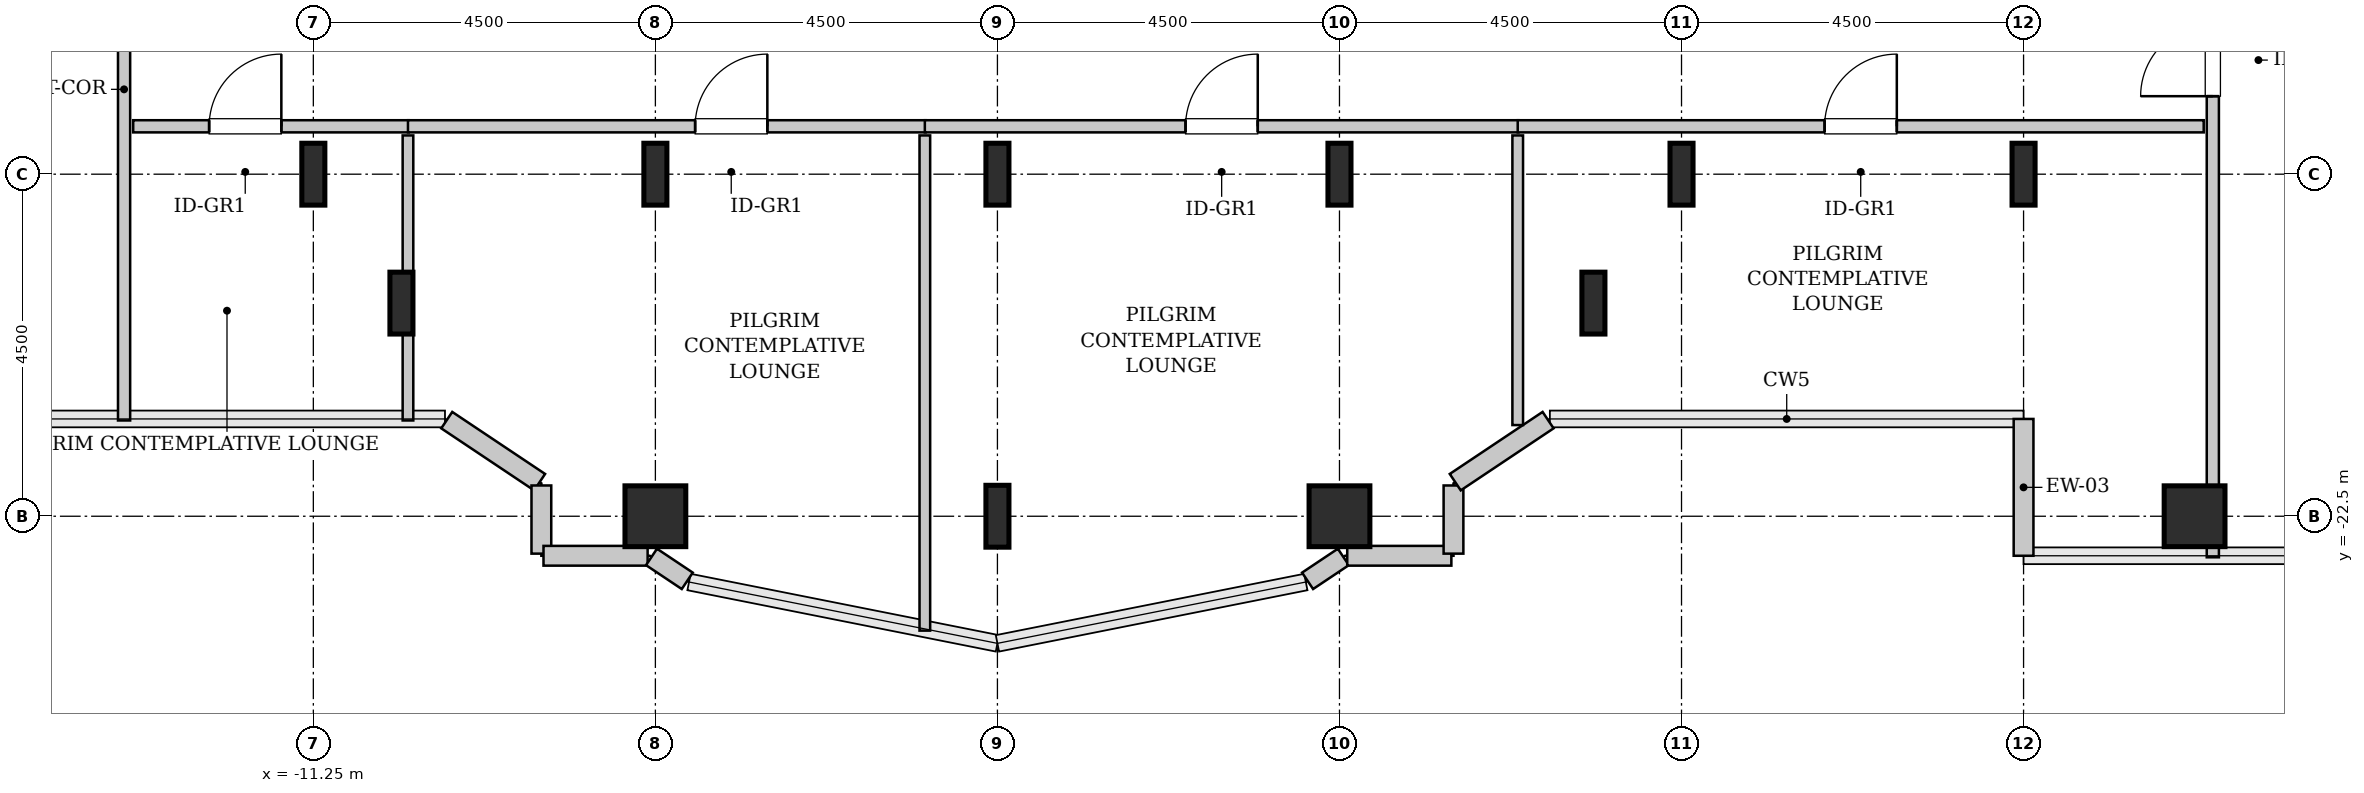
"""IFC4 building model, lengths in metres.
Left out: names, types, materials, properties, quantities, classifications, styles, units other than length and angle.
Written with IfcOpenShell. Run it as: python <this file> out.ifc"""

import sys

from ifc_helpers import new_model, si_unit, direction, frame, frame_2d, origin, origin_2d, place, context, subcontext, project, spatial, rectangle, hollow_rectangle, i_section, extrude, source, transform, mapped, element, fill, save


model = new_model("IFC4")
c1 = context("Model", 3, precision=1e-05, world=origin(), true_north=direction((0.0, 1.0)))
c2 = subcontext(c1, "Body", "Model", "MODEL_VIEW")
j1 = project(units=[si_unit("LENGTHUNIT", "METRE"), si_unit("PLANEANGLEUNIT", "RADIAN")], contexts=[c1])
p1 = place(None, origin())
s1 = spatial("IfcSite", under=j1, at=p1, CompositionType="ELEMENT")
p2 = place(p1, origin())
s2 = spatial("IfcBuilding", under=s1, at=p2, CompositionType="ELEMENT")
p3 = place(p2, frame((0.0, 0.0, 198.2)))
s3 = spatial("IfcBuildingStorey", under=s2, at=p3, CompositionType="ELEMENT", Elevation=198.2)
m1 = source(origin(), c2, "Body", "SweptSolid", [
    extrude(i_section(OverallWidth=0.303, OverallDepth=0.814, WebThickness=0.021, FlangeThickness=0.04, FilletRadius=0.03, at=origin_2d()), origin(), (0.0, 0.0, 1.0), 3.8),
])
for number, where, z_axis, x_axis in (
    (1, (-11.25, -18.0, 0.0), (0.0, 0.0, 1.0), (1.0, 0.0, 0.0)),
    (2, (-10.091, -19.696, 0.0), (0.0, 0.0, 1.0), (1.0, 0.0, 0.0)),
):
    element("IfcColumn", number, at=place(p3, frame(where, z_axis=z_axis, x_axis=x_axis)), inside=s3, PredefinedType="COLUMN", context=c2, shape_type="MappedRepresentation", body=[
        mapped(m1, transform((0.0, 0.0, 0.0), x_axis=(1.0, 0.0, 0.0), y_axis=(0.0, 1.0, 0.0), z_axis=(0.0, 0.0, 1.0), scale=1.0)),
    ])
m2 = source(origin(), c2, "Body", "SweptSolid", [
    extrude(hollow_rectangle(XDim=0.8, YDim=0.8, WallThickness=0.04, InnerFilletRadius=0.04, OuterFilletRadius=0.08, at=origin_2d()), origin(), (0.0, 0.0, 1.0), 3.8),
])
p4 = place(p3, frame((-6.75, -22.5, 0.0), z_axis=(0.0, 0.0, 1.0), x_axis=(1.0, 0.0, 0.0)))
e3 = element("IfcColumn", 3, at=p4, inside=s3, PredefinedType="COLUMN", context=c2, shape_type="MappedRepresentation", body=[
    mapped(m2, transform((0.0, 0.0, 0.0), x_axis=(1.0, 0.0, 0.0), y_axis=(0.0, 1.0, 0.0), z_axis=(0.0, 0.0, 1.0), scale=1.0)),
])
for number, where, z_axis, x_axis in (
    (4, (-6.75, -18.0, 0.0), (0.0, 0.0, 1.0), (1.0, 0.0, 0.0)),
    (5, (-2.25, -22.5, 0.0), (0.0, 0.0, 1.0), (1.0, 0.0, 0.0)),
    (6, (-2.25, -18.0, 0.0), (0.0, 0.0, 1.0), (1.0, 0.0, 0.0)),
):
    element("IfcColumn", number, at=place(p3, frame(where, z_axis=z_axis, x_axis=x_axis)), inside=s3, PredefinedType="COLUMN", context=c2, shape_type="MappedRepresentation", body=[
        mapped(m1, transform((0.0, 0.0, 0.0), x_axis=(1.0, 0.0, 0.0), y_axis=(0.0, 1.0, 0.0), z_axis=(0.0, 0.0, 1.0), scale=1.0)),
    ])
p5 = place(p3, frame((2.25, -22.5, 0.0), z_axis=(0.0, 0.0, 1.0), x_axis=(1.0, 0.0, 0.0)))
e7 = element("IfcColumn", 7, at=p5, inside=s3, PredefinedType="COLUMN", context=c2, shape_type="MappedRepresentation", body=[
    mapped(m2, transform((0.0, 0.0, 0.0), x_axis=(1.0, 0.0, 0.0), y_axis=(0.0, 1.0, 0.0), z_axis=(0.0, 0.0, 1.0), scale=1.0)),
])
for number, where, z_axis, x_axis in (
    (8, (2.25, -18.0, 0.0), (0.0, 0.0, 1.0), (1.0, 0.0, 0.0)),
    (9, (5.591, -19.696, 0.0), (0.0, 0.0, 1.0), (1.0, 0.0, 0.0)),
    (10, (6.75, -18.0, 0.0), (0.0, 0.0, 1.0), (1.0, 0.0, 0.0)),
    (11, (11.25, -18.0, 0.0), (0.0, 0.0, 1.0), (1.0, 0.0, 0.0)),
):
    element("IfcColumn", number, at=place(p3, frame(where, z_axis=z_axis, x_axis=x_axis)), inside=s3, PredefinedType="COLUMN", context=c2, shape_type="MappedRepresentation", body=[
        mapped(m1, transform((0.0, 0.0, 0.0), x_axis=(1.0, 0.0, 0.0), y_axis=(0.0, 1.0, 0.0), z_axis=(0.0, 0.0, 1.0), scale=1.0)),
    ])
p6 = place(p3, frame((13.5, -22.5, 0.0), z_axis=(0.0, 0.0, 1.0), x_axis=(1.0, 0.0, 0.0)))
e12 = element("IfcColumn", 12, at=p6, inside=s3, PredefinedType="COLUMN", context=c2, shape_type="MappedRepresentation", body=[
    mapped(m2, transform((0.0, 0.0, 0.0), x_axis=(1.0, 0.0, 0.0), y_axis=(0.0, 1.0, 0.0), z_axis=(0.0, 0.0, 1.0), scale=1.0)),
])
m3 = source(origin(), c2, "Body", "SweptSolid", [
    extrude(rectangle(XDim=1.8, YDim=0.26, at=frame_2d((0.9, 0.0))), origin(), (0.0, 0.0, 1.0), 3.5),
])
p7 = place(p3, frame((11.25, -21.22, 0.0), z_axis=(0.0, 0.0, 1.0), x_axis=(0.0, -1.0, 0.0)))
e13 = element("IfcWall", 13, at=p7, inside=s3, PredefinedType="SOLIDWALL", context=c2, shape_type="MappedRepresentation", body=[
    mapped(m3, transform((0.0, 0.0, 0.0), x_axis=(1.0, 0.0, 0.0), y_axis=(0.0, 1.0, 0.0), z_axis=(0.0, 0.0, 1.0), scale=1.0)),
])
m4 = source(origin(), c2, "Body", "SweptSolid", [
    extrude(rectangle(XDim=1.469, YDim=0.26, at=frame_2d((0.734, 0.0))), origin(), (0.0, 0.0, 1.0), 3.5),
])
p8 = place(p3, frame((-9.495, -21.236, 0.0), z_axis=(0.0, 0.0, 1.0), x_axis=(0.831461760506, -0.555581983884, 0.0)))
e14 = element("IfcWall", 14, at=p8, inside=s3, PredefinedType="SOLIDWALL", context=c2, shape_type="MappedRepresentation", body=[
    mapped(m4, transform((0.0, 0.0, 0.0), x_axis=(1.0, 0.0, 0.0), y_axis=(0.0, 1.0, 0.0), z_axis=(0.0, 0.0, 1.0), scale=1.0)),
])
m5 = source(origin(), c2, "Body", "SweptSolid", [
    extrude(rectangle(XDim=0.897, YDim=0.26, at=frame_2d((0.448, 0.0))), origin(), (0.0, 0.0, 1.0), 3.5),
])
p9 = place(p3, frame((-8.25, -22.095, 0.0), z_axis=(0.0, 0.0, 1.0), x_axis=(0.0, -1.0, 0.0)))
e15 = element("IfcWall", 15, at=p9, inside=s3, PredefinedType="SOLIDWALL", context=c2, shape_type="MappedRepresentation", body=[
    mapped(m5, transform((0.0, 0.0, 0.0), x_axis=(1.0, 0.0, 0.0), y_axis=(0.0, 1.0, 0.0), z_axis=(0.0, 0.0, 1.0), scale=1.0)),
])
m6 = source(origin(), c2, "Body", "SweptSolid", [
    extrude(rectangle(XDim=1.37, YDim=0.26, at=frame_2d((0.685, 0.0))), origin(), (0.0, 0.0, 1.0), 3.5),
])
p10 = place(p3, frame((-8.222, -23.02, 0.0), z_axis=(0.0, 0.0, 1.0), x_axis=(1.0, 0.0, 0.0)))
e16 = element("IfcWall", 16, at=p10, inside=s3, PredefinedType="SOLIDWALL", context=c2, shape_type="MappedRepresentation", body=[
    mapped(m6, transform((0.0, 0.0, 0.0), x_axis=(1.0, 0.0, 0.0), y_axis=(0.0, 1.0, 0.0), z_axis=(0.0, 0.0, 1.0), scale=1.0)),
])
m7 = source(origin(), c2, "Body", "SweptSolid", [
    extrude(rectangle(XDim=0.565, YDim=0.26, at=frame_2d((0.283, 0.0))), origin(), (0.0, 0.0, 1.0), 3.5),
])
for number, where, z_axis, x_axis in (
    (17, (-6.801, -23.036, 0.0), (0.0, 0.0, 1.0), (0.832, -0.555, 0.0)),
    (18, (1.831, -23.35, 0.0), (0.0, 0.0, 1.0), (0.832, 0.555, 0.0)),
):
    element("IfcWall", number, at=place(p3, frame(where, z_axis=z_axis, x_axis=x_axis)), inside=s3, PredefinedType="SOLIDWALL", context=c2, shape_type="MappedRepresentation", body=[
        mapped(m7, transform((0.0, 0.0, 0.0), x_axis=(1.0, 0.0, 0.0), y_axis=(0.0, 1.0, 0.0), z_axis=(0.0, 0.0, 1.0), scale=1.0)),
    ])
p11 = place(p3, frame((2.352, -23.02, 0.0), z_axis=(0.0, 0.0, 1.0), x_axis=(1.0, 0.0, 0.0)))
e19 = element("IfcWall", 19, at=p11, inside=s3, PredefinedType="SOLIDWALL", context=c2, shape_type="MappedRepresentation", body=[
    mapped(m6, transform((0.0, 0.0, 0.0), x_axis=(1.0, 0.0, 0.0), y_axis=(0.0, 1.0, 0.0), z_axis=(0.0, 0.0, 1.0), scale=1.0)),
])
p12 = place(p3, frame((3.75, -22.992, 0.0), z_axis=(0.0, 0.0, 1.0), x_axis=(0.0, 1.0, 0.0)))
e20 = element("IfcWall", 20, at=p12, inside=s3, PredefinedType="SOLIDWALL", context=c2, shape_type="MappedRepresentation", body=[
    mapped(m5, transform((0.0, 0.0, 0.0), x_axis=(1.0, 0.0, 0.0), y_axis=(0.0, 1.0, 0.0), z_axis=(0.0, 0.0, 1.0), scale=1.0)),
])
p13 = place(p3, frame((3.773, -22.052, 0.0), z_axis=(0.0, 0.0, 1.0), x_axis=(0.831461760506, 0.555581983884, 0.0)))
e21 = element("IfcWall", 21, at=p13, inside=s3, PredefinedType="SOLIDWALL", context=c2, shape_type="MappedRepresentation", body=[
    mapped(m4, transform((0.0, 0.0, 0.0), x_axis=(1.0, 0.0, 0.0), y_axis=(0.0, 1.0, 0.0), z_axis=(0.0, 0.0, 1.0), scale=1.0)),
])
m8 = source(origin(), c2, "Body", "SweptSolid", [
    extrude(rectangle(XDim=14.445, YDim=0.16, at=frame_2d((7.223, 0.0))), origin(), (0.0, 0.0, 1.0), 3.485),
])
p14 = place(p3, frame((-13.74, -21.24, 0.0), z_axis=(0.0, 0.0, 1.0), x_axis=(0.0, 1.0, 0.0)))
e22 = element("IfcWall", 22, at=p14, inside=s3, PredefinedType="PARTITIONING", context=c2, shape_type="MappedRepresentation", body=[
    mapped(m8, transform((0.0, 0.0, 0.0), x_axis=(1.0, 0.0, 0.0), y_axis=(0.0, 1.0, 0.0), z_axis=(0.0, 0.0, 1.0), scale=1.0)),
])
p15 = place(p14, frame((8.663, 0.0, 0.0)))
e23 = element("IfcOpeningElement", 23, at=p15, cuts=e22, PredefinedType="OPENING", context=c2, shape_type="SweptSolid", body=[
    extrude(rectangle(XDim=0.95, YDim=2.1, at=frame_2d((0.475, 1.05))), frame((0.0, 0.09, 0.0), z_axis=(0.0, -1.0, 0.0), x_axis=(1.0, 0.0, 0.0)), (0.0, 0.0, 1.0), 0.18),
])
m9 = source(origin(), c2, "Body", "SweptSolid", [
    extrude(rectangle(XDim=7.453, YDim=0.16, at=frame_2d((3.726, 0.0))), origin(), (0.0, 0.0, 1.0), 3.485),
])
p16 = place(p3, frame((13.74, -23.04, 0.0), z_axis=(0.0, 0.0, 1.0), x_axis=(0.0, 1.0, 0.0)))
e24 = element("IfcWall", 24, at=p16, inside=s3, PredefinedType="PARTITIONING", context=c2, shape_type="MappedRepresentation", body=[
    mapped(m9, transform((0.0, 0.0, 0.0), x_axis=(1.0, 0.0, 0.0), y_axis=(0.0, 1.0, 0.0), z_axis=(0.0, 0.0, 1.0), scale=1.0)),
])
p17 = place(p16, frame((6.066, 0.0, 0.0)))
e25 = element("IfcOpeningElement", 25, at=p17, cuts=e24, PredefinedType="OPENING", context=c2, shape_type="SweptSolid", body=[
    extrude(rectangle(XDim=0.95, YDim=2.1, at=frame_2d((0.475, 1.05))), frame((0.0, 0.09, 0.0), z_axis=(0.0, -1.0, 0.0), x_axis=(1.0, 0.0, 0.0)), (0.0, 0.0, 1.0), 0.18),
])
m10 = source(origin(), c2, "Body", "SweptSolid", [
    extrude(rectangle(XDim=3.625, YDim=0.16, at=frame_2d((1.812, 0.0))), origin(), (0.0, 0.0, 1.0), 3.485),
])
p18 = place(p3, frame((-13.62, -17.37, 0.0), z_axis=(0.0, 0.0, 1.0), x_axis=(1.0, 0.0, 0.0)))
e26 = element("IfcWall", 26, at=p18, inside=s3, PredefinedType="PARTITIONING", context=c2, shape_type="MappedRepresentation", body=[
    mapped(m10, transform((0.0, 0.0, 0.0), x_axis=(1.0, 0.0, 0.0), y_axis=(0.0, 1.0, 0.0), z_axis=(0.0, 0.0, 1.0), scale=1.0)),
])
p19 = place(p18, frame((0.999, 0.0, 0.0)))
e27 = element("IfcOpeningElement", 27, at=p19, cuts=e26, PredefinedType="OPENING", context=c2, shape_type="SweptSolid", body=[
    extrude(rectangle(XDim=0.95, YDim=2.1, at=frame_2d((0.475, 1.05))), frame((0.0, 0.09, 0.0), z_axis=(0.0, -1.0, 0.0), x_axis=(1.0, 0.0, 0.0)), (0.0, 0.0, 1.0), 0.18),
])
m11 = source(origin(), c2, "Body", "SweptSolid", [
    extrude(rectangle(XDim=3.75, YDim=0.14, at=frame_2d((1.875, 0.0))), origin(), (0.0, 0.0, 1.0), 3.485),
])
p20 = place(p3, frame((-10.005, -21.24, 0.0), z_axis=(0.0, 0.0, 1.0), x_axis=(0.0, 1.0, 0.0)))
e28 = element("IfcWall", 28, at=p20, inside=s3, PredefinedType="PARTITIONING", context=c2, shape_type="MappedRepresentation", body=[
    mapped(m11, transform((0.0, 0.0, 0.0), x_axis=(1.0, 0.0, 0.0), y_axis=(0.0, 1.0, 0.0), z_axis=(0.0, 0.0, 1.0), scale=1.0)),
])
m12 = source(origin(), c2, "Body", "SweptSolid", [
    extrude(rectangle(XDim=6.81, YDim=0.16, at=frame_2d((3.405, 0.0))), origin(), (0.0, 0.0, 1.0), 3.485),
])
p21 = place(p3, frame((-10.005, -17.37, 0.0), z_axis=(0.0, 0.0, 1.0), x_axis=(1.0, 0.0, 0.0)))
e29 = element("IfcWall", 29, at=p21, inside=s3, PredefinedType="PARTITIONING", context=c2, shape_type="MappedRepresentation", body=[
    mapped(m12, transform((0.0, 0.0, 0.0), x_axis=(1.0, 0.0, 0.0), y_axis=(0.0, 1.0, 0.0), z_axis=(0.0, 0.0, 1.0), scale=1.0)),
])
p22 = place(p21, frame((3.778, 0.0, 0.0)))
e30 = element("IfcOpeningElement", 30, at=p22, cuts=e29, PredefinedType="OPENING", context=c2, shape_type="SweptSolid", body=[
    extrude(rectangle(XDim=0.95, YDim=2.1, at=frame_2d((0.475, 1.05))), frame((0.0, 0.09, 0.0), z_axis=(0.0, -1.0, 0.0), x_axis=(1.0, 0.0, 0.0)), (0.0, 0.0, 1.0), 0.18),
])
m13 = source(origin(), c2, "Body", "SweptSolid", [
    extrude(rectangle(XDim=6.515, YDim=0.14, at=frame_2d((3.257, 0.0))), origin(), (0.0, 0.0, 1.0), 3.485),
])
p23 = place(p3, frame((-3.205, -24.005, 0.0), z_axis=(0.0, 0.0, 1.0), x_axis=(0.0, 1.0, 0.0)))
e31 = element("IfcWall", 31, at=p23, inside=s3, PredefinedType="PARTITIONING", context=c2, shape_type="MappedRepresentation", body=[
    mapped(m13, transform((0.0, 0.0, 0.0), x_axis=(1.0, 0.0, 0.0), y_axis=(0.0, 1.0, 0.0), z_axis=(0.0, 0.0, 1.0), scale=1.0)),
])
m14 = source(origin(), c2, "Body", "SweptSolid", [
    extrude(rectangle(XDim=7.81, YDim=0.16, at=frame_2d((3.905, 0.0))), origin(), (0.0, 0.0, 1.0), 3.485),
])
p24 = place(p3, frame((-3.205, -17.37, 0.0), z_axis=(0.0, 0.0, 1.0), x_axis=(1.0, 0.0, 0.0)))
e32 = element("IfcWall", 32, at=p24, inside=s3, PredefinedType="PARTITIONING", context=c2, shape_type="MappedRepresentation", body=[
    mapped(m14, transform((0.0, 0.0, 0.0), x_axis=(1.0, 0.0, 0.0), y_axis=(0.0, 1.0, 0.0), z_axis=(0.0, 0.0, 1.0), scale=1.0)),
])
p25 = place(p24, frame((3.43, 0.0, 0.0)))
e33 = element("IfcOpeningElement", 33, at=p25, cuts=e32, PredefinedType="OPENING", context=c2, shape_type="SweptSolid", body=[
    extrude(rectangle(XDim=0.95, YDim=2.1, at=frame_2d((0.475, 1.05))), frame((0.0, 0.09, 0.0), z_axis=(0.0, -1.0, 0.0), x_axis=(1.0, 0.0, 0.0)), (0.0, 0.0, 1.0), 0.18),
])
m15 = source(origin(), c2, "Body", "SweptSolid", [
    extrude(rectangle(XDim=3.811, YDim=0.14, at=frame_2d((1.905, 0.0))), origin(), (0.0, 0.0, 1.0), 3.485),
])
p26 = place(p3, frame((4.595, -21.301, 0.0), z_axis=(0.0, 0.0, 1.0), x_axis=(0.0, 1.0, 0.0)))
e34 = element("IfcWall", 34, at=p26, inside=s3, PredefinedType="PARTITIONING", context=c2, shape_type="MappedRepresentation", body=[
    mapped(m15, transform((0.0, 0.0, 0.0), x_axis=(1.0, 0.0, 0.0), y_axis=(0.0, 1.0, 0.0), z_axis=(0.0, 0.0, 1.0), scale=1.0)),
])
m16 = source(origin(), c2, "Body", "SweptSolid", [
    extrude(rectangle(XDim=9.025, YDim=0.16, at=frame_2d((4.513, 0.0))), origin(), (0.0, 0.0, 1.0), 3.485),
])
p27 = place(p3, frame((4.595, -17.37, 0.0), z_axis=(0.0, 0.0, 1.0), x_axis=(1.0, 0.0, 0.0)))
e35 = element("IfcWall", 35, at=p27, inside=s3, PredefinedType="PARTITIONING", context=c2, shape_type="MappedRepresentation", body=[
    mapped(m16, transform((0.0, 0.0, 0.0), x_axis=(1.0, 0.0, 0.0), y_axis=(0.0, 1.0, 0.0), z_axis=(0.0, 0.0, 1.0), scale=1.0)),
])
p28 = place(p27, frame((4.038, 0.0, 0.0)))
e36 = element("IfcOpeningElement", 36, at=p28, cuts=e35, PredefinedType="OPENING", context=c2, shape_type="SweptSolid", body=[
    extrude(rectangle(XDim=0.95, YDim=2.1, at=frame_2d((0.475, 1.05))), frame((0.0, 0.09, 0.0), z_axis=(0.0, -1.0, 0.0), x_axis=(1.0, 0.0, 0.0)), (0.0, 0.0, 1.0), 0.18),
])
m17 = source(origin(), c2, "Body", "SweptSolid", [
    extrude(rectangle(XDim=0.95, YDim=2.1, at=frame_2d((0.475, 1.05))), frame((0.0, 0.025, 0.0), z_axis=(0.0, -1.0, 0.0), x_axis=(1.0, 0.0, 0.0)), (0.0, 0.0, 1.0), 0.05),
])
p29 = place(p17, origin())
e37 = element("IfcDoor", 37, at=p29, inside=s3, OperationType="SINGLE_SWING_LEFT", PredefinedType="DOOR", context=c2, shape_type="MappedRepresentation", body=[
    mapped(m17, transform((0.0, 0.0, 0.0), x_axis=(1.0, 0.0, 0.0), y_axis=(0.0, 1.0, 0.0), z_axis=(0.0, 0.0, 1.0), scale=1.0)),
])
fill(e25, e37)
p30 = place(p19, origin())
e38 = element("IfcDoor", 38, at=p30, inside=s3, OperationType="SINGLE_SWING_RIGHT", PredefinedType="DOOR", context=c2, shape_type="MappedRepresentation", body=[
    mapped(m17, transform((0.0, 0.0, 0.0), x_axis=(1.0, 0.0, 0.0), y_axis=(0.0, 1.0, 0.0), z_axis=(0.0, 0.0, 1.0), scale=1.0)),
])
fill(e27, e38)
p31 = place(p22, origin())
e39 = element("IfcDoor", 39, at=p31, inside=s3, OperationType="SINGLE_SWING_RIGHT", PredefinedType="DOOR", context=c2, shape_type="MappedRepresentation", body=[
    mapped(m17, transform((0.0, 0.0, 0.0), x_axis=(1.0, 0.0, 0.0), y_axis=(0.0, 1.0, 0.0), z_axis=(0.0, 0.0, 1.0), scale=1.0)),
])
fill(e30, e39)
p32 = place(p25, origin())
e40 = element("IfcDoor", 40, at=p32, inside=s3, OperationType="SINGLE_SWING_RIGHT", PredefinedType="DOOR", context=c2, shape_type="MappedRepresentation", body=[
    mapped(m17, transform((0.0, 0.0, 0.0), x_axis=(1.0, 0.0, 0.0), y_axis=(0.0, 1.0, 0.0), z_axis=(0.0, 0.0, 1.0), scale=1.0)),
])
fill(e33, e40)
p33 = place(p28, origin())
e41 = element("IfcDoor", 41, at=p33, inside=s3, OperationType="SINGLE_SWING_RIGHT", PredefinedType="DOOR", context=c2, shape_type="MappedRepresentation", body=[
    mapped(m17, transform((0.0, 0.0, 0.0), x_axis=(1.0, 0.0, 0.0), y_axis=(0.0, 1.0, 0.0), z_axis=(0.0, 0.0, 1.0), scale=1.0)),
])
fill(e36, e41)
save(model, sys.argv[1])
